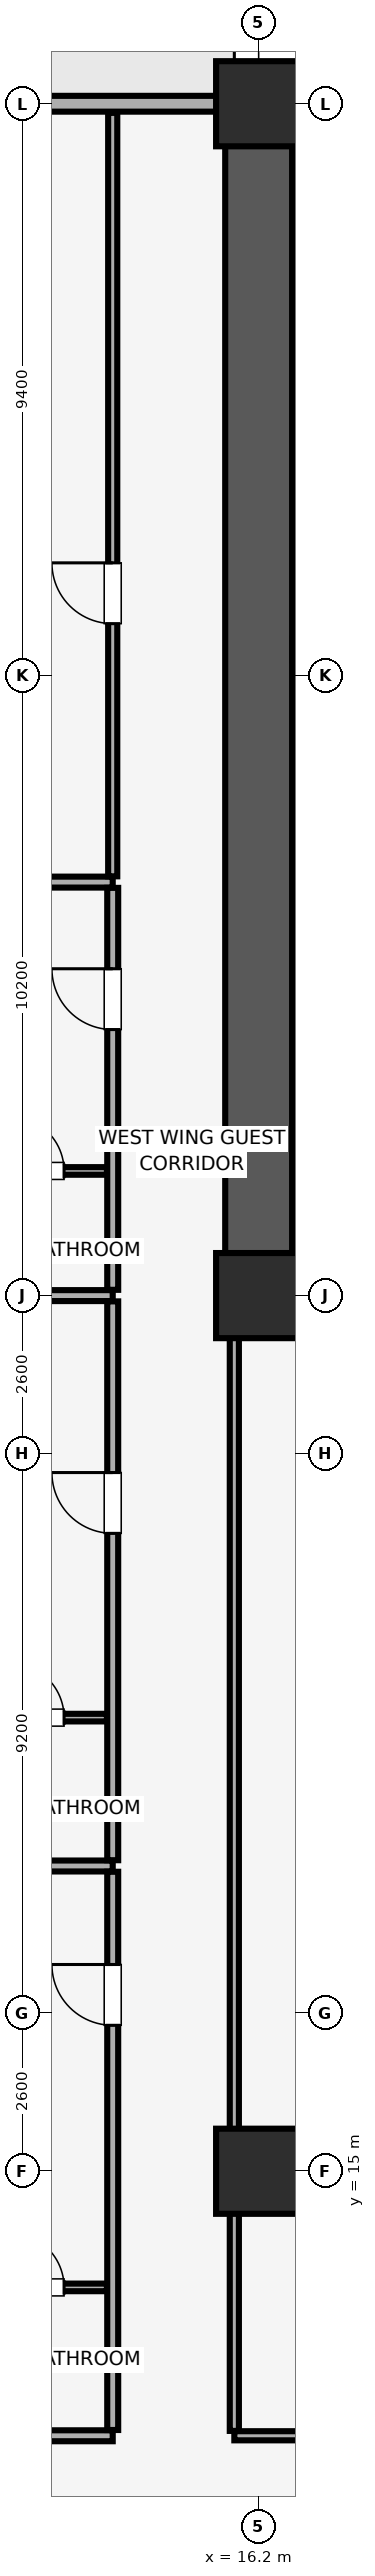
"""IFC4 building model, lengths in metres.
Left out: names, types, materials, properties, quantities, classifications, styles, units other than length and angle.
Written with IfcOpenShell. Run it as: python <this file> out.ifc"""

import sys

from ifc_helpers import new_model, si_unit, direction, frame, frame_2d, origin, origin_2d, place, context, subcontext, project, spatial, rectangle, extrude, element, fill, save


model = new_model("IFC4")
c1 = context("Model", 3, precision=1e-05, world=origin(), true_north=direction((0.0, 1.0)))
c2 = subcontext(c1, "Body", "Model", "MODEL_VIEW")
j1 = project(units=[si_unit("LENGTHUNIT", "METRE"), si_unit("PLANEANGLEUNIT", "RADIAN")], contexts=[c1])
p1 = place(None, origin())
s1 = spatial("IfcSite", under=j1, at=p1, CompositionType="ELEMENT")
p2 = place(p1, origin())
s2 = spatial("IfcBuilding", under=s1, at=p2, CompositionType="ELEMENT")
p3 = place(p2, frame((0.0, 0.0, 31.4)))
s3 = spatial("IfcBuildingStorey", under=s2, at=p3, CompositionType="ELEMENT", Elevation=31.4)
for number, where, z_axis, x_axis in (
    (1, (16.2, 15.0, 0.0), (0.0, 0.0, 1.0), (1.0, 0.0, 0.0)),
    (2, (16.2, 29.4, 0.0), (0.0, 0.0, 1.0), (1.0, 0.0, 0.0)),
    (3, (16.2, 49.0, 0.0), (0.0, 0.0, 1.0), (1.0, 0.0, 0.0)),
):
    element("IfcColumn", number, at=place(p3, frame(where, z_axis=z_axis, x_axis=x_axis)), inside=s3, PredefinedType="COLUMN", context=c2, shape_type="SweptSolid", body=[
        extrude(rectangle(XDim=1.4, YDim=1.4, at=origin_2d()), origin(), (0.0, 0.0, 1.0), 3.51),
    ])
p4 = place(p3, frame((79.8, 49.0, 0.0), z_axis=(0.0, 0.0, 1.0), x_axis=(-1.0, 0.0, 0.0)))
e4 = element("IfcWall", 4, at=p4, inside=s3, PredefinedType="SOLIDWALL", context=c2, shape_type="SweptSolid", body=[
    extrude(rectangle(XDim=75.6, YDim=0.26, at=frame_2d((37.8, 0.0))), origin(), (0.0, 0.0, 1.0), 2.56),
])
p5 = place(p4, frame((72.565, 0.0, 0.85)))
e5 = element("IfcOpeningElement", 5, at=p5, cuts=e4, PredefinedType="OPENING", context=c2, shape_type="SweptSolid", body=[
    extrude(rectangle(XDim=1.5, YDim=1.4, at=frame_2d((0.75, 0.7))), frame((0.0, 0.14, 0.0), z_axis=(0.0, -1.0, 0.0), x_axis=(1.0, 0.0, 0.0)), (0.0, 0.0, 1.0), 0.28),
])
p6 = place(p4, frame((67.45, 0.0, 0.85)))
e6 = element("IfcOpeningElement", 6, at=p6, cuts=e4, PredefinedType="OPENING", context=c2, shape_type="SweptSolid", body=[
    extrude(rectangle(XDim=1.5, YDim=1.4, at=frame_2d((0.75, 0.7))), frame((0.0, 0.14, 0.0), z_axis=(0.0, -1.0, 0.0), x_axis=(1.0, 0.0, 0.0)), (0.0, 0.0, 1.0), 0.28),
])
p7 = place(p4, frame((6.65, 0.0, 0.85)))
e7 = element("IfcOpeningElement", 7, at=p7, cuts=e4, PredefinedType="OPENING", context=c2, shape_type="SweptSolid", body=[
    extrude(rectangle(XDim=1.5, YDim=1.4, at=frame_2d((0.75, 0.7))), frame((0.0, 0.14, 0.0), z_axis=(0.0, -1.0, 0.0), x_axis=(1.0, 0.0, 0.0)), (0.0, 0.0, 1.0), 0.28),
])
p8 = place(p4, frame((1.535, 0.0, 0.85)))
e8 = element("IfcOpeningElement", 8, at=p8, cuts=e4, PredefinedType="OPENING", context=c2, shape_type="SweptSolid", body=[
    extrude(rectangle(XDim=1.5, YDim=1.4, at=frame_2d((0.75, 0.7))), frame((0.0, 0.14, 0.0), z_axis=(0.0, -1.0, 0.0), x_axis=(1.0, 0.0, 0.0)), (0.0, 0.0, 1.0), 0.28),
])
p9 = place(p4, frame((51.365, 0.0, 0.9)))
e9 = element("IfcOpeningElement", 9, at=p9, cuts=e4, PredefinedType="OPENING", context=c2, shape_type="SweptSolid", body=[
    extrude(rectangle(XDim=1.5, YDim=1.4, at=frame_2d((0.75, 0.7))), frame((0.0, 0.14, 0.0), z_axis=(0.0, -1.0, 0.0), x_axis=(1.0, 0.0, 0.0)), (0.0, 0.0, 1.0), 0.28),
])
p10 = place(p4, frame((46.0, 0.0, 0.9)))
e10 = element("IfcOpeningElement", 10, at=p10, cuts=e4, PredefinedType="OPENING", context=c2, shape_type="SweptSolid", body=[
    extrude(rectangle(XDim=1.5, YDim=1.4, at=frame_2d((0.75, 0.7))), frame((0.0, 0.14, 0.0), z_axis=(0.0, -1.0, 0.0), x_axis=(1.0, 0.0, 0.0)), (0.0, 0.0, 1.0), 0.28),
])
p11 = place(p4, frame((29.15, 0.0, 0.9)))
e11 = element("IfcOpeningElement", 11, at=p11, cuts=e4, PredefinedType="OPENING", context=c2, shape_type="SweptSolid", body=[
    extrude(rectangle(XDim=1.5, YDim=1.4, at=frame_2d((0.75, 0.7))), frame((0.0, 0.14, 0.0), z_axis=(0.0, -1.0, 0.0), x_axis=(1.0, 0.0, 0.0)), (0.0, 0.0, 1.0), 0.28),
])
p12 = place(p4, frame((23.485, 0.0, 0.9)))
e12 = element("IfcOpeningElement", 12, at=p12, cuts=e4, PredefinedType="OPENING", context=c2, shape_type="SweptSolid", body=[
    extrude(rectangle(XDim=1.5, YDim=1.4, at=frame_2d((0.75, 0.7))), frame((0.0, 0.14, 0.0), z_axis=(0.0, -1.0, 0.0), x_axis=(1.0, 0.0, 0.0)), (0.0, 0.0, 1.0), 0.28),
])
p13 = place(p3, frame((16.2, 29.4, 0.0), z_axis=(0.0, 0.0, 1.0), x_axis=(0.0, 1.0, 0.0)))
e13 = element("IfcWall", 13, at=p13, inside=s3, PredefinedType="SHEAR", context=c2, shape_type="SweptSolid", body=[
    extrude(rectangle(XDim=19.2, YDim=1.1, at=frame_2d((9.6, 0.0))), origin(), (0.0, 0.0, 1.0), 3.51),
])
p14 = place(p3, frame((16.755, 29.4, 0.0), z_axis=(0.0, 0.0, 1.0), x_axis=(1.0, 0.0, 0.0)))
e14 = element("IfcWall", 14, at=p14, inside=s3, PredefinedType="SHEAR", context=c2, shape_type="SweptSolid", body=[
    extrude(rectangle(XDim=6.845, YDim=1.1, at=frame_2d((3.423, 0.0))), origin(), (0.0, 0.0, 1.0), 3.51),
])
p15 = place(p3, frame((16.755, 40.025, 0.0), z_axis=(0.0, 0.0, 1.0), x_axis=(1.0, 0.0, 0.0)))
e15 = element("IfcWall", 15, at=p15, inside=s3, PredefinedType="SHEAR", context=c2, shape_type="SweptSolid", body=[
    extrude(rectangle(XDim=4.1, YDim=0.35, at=frame_2d((2.05, 0.0))), origin(), (0.0, 0.0, 1.0), 3.51),
])
p16 = place(p15, frame((1.71, 0.0, 0.0)))
e16 = element("IfcOpeningElement", 16, at=p16, cuts=e15, PredefinedType="OPENING", context=c2, shape_type="SweptSolid", body=[
    extrude(rectangle(XDim=1.15, YDim=2.15, at=frame_2d((0.575, 1.075))), frame((0.0, 0.185, 0.0), z_axis=(0.0, -1.0, 0.0), x_axis=(1.0, 0.0, 0.0)), (0.0, 0.0, 1.0), 0.37),
])
p17 = place(p3, frame((15.8, 10.65, 0.0), z_axis=(0.0, 0.0, 1.0), x_axis=(1.0, 0.0, 0.0)))
e17 = element("IfcWall", 17, at=p17, inside=s3, PredefinedType="PARTITIONING", context=c2, shape_type="SweptSolid", body=[
    extrude(rectangle(XDim=9.4, YDim=0.15, at=frame_2d((4.7, 0.0))), origin(), (0.0, 0.0, 1.0), 3.51),
])
p18 = place(p17, frame((4.2, 0.0, 0.0)))
e18 = element("IfcOpeningElement", 18, at=p18, cuts=e17, PredefinedType="OPENING", context=c2, shape_type="SweptSolid", body=[
    extrude(rectangle(XDim=1.0, YDim=2.15, at=frame_2d((0.5, 1.075))), frame((0.0, 0.085, 0.0), z_axis=(0.0, -1.0, 0.0), x_axis=(1.0, 0.0, 0.0)), (0.0, 0.0, 1.0), 0.17),
])
p19 = place(p3, frame((15.8, 10.73, 0.0), z_axis=(0.0, 0.0, 1.0), x_axis=(0.0, 1.0, 0.0)))
e19 = element("IfcWall", 19, at=p19, inside=s3, PredefinedType="PARTITIONING", context=c2, shape_type="SweptSolid", body=[
    extrude(rectangle(XDim=18.66, YDim=0.15, at=frame_2d((9.33, 0.0))), origin(), (0.0, 0.0, 1.0), 3.51),
])
for number, where, z_axis, x_axis in (
    (20, (0.15, 10.65, 0.0), (0.0, 0.0, 1.0), (1.0, 0.0, 0.0)),
    (21, (0.15, 20.02, 0.0), (0.0, 0.0, 1.0), (1.0, 0.0, 0.0)),
):
    element("IfcWall", number, at=place(p3, frame(where, z_axis=z_axis, x_axis=x_axis)), inside=s3, PredefinedType="PARTITIONING", context=c2, shape_type="SweptSolid", body=[
        extrude(rectangle(XDim=13.65, YDim=0.18, at=frame_2d((6.825, 0.0))), origin(), (0.0, 0.0, 1.0), 3.51),
    ])
p20 = place(p3, frame((13.8, 10.745, 0.0), z_axis=(0.0, 0.0, 1.0), x_axis=(0.0, 1.0, 0.0)))
e22 = element("IfcWall", 22, at=p20, inside=s3, PredefinedType="PARTITIONING", context=c2, shape_type="SweptSolid", body=[
    extrude(rectangle(XDim=9.18, YDim=0.18, at=frame_2d((4.59, 0.0))), origin(), (0.0, 0.0, 1.0), 3.51),
])
p21 = place(p20, frame((6.655, 0.0, 0.0)))
e23 = element("IfcOpeningElement", 23, at=p21, cuts=e22, PredefinedType="OPENING", context=c2, shape_type="SweptSolid", body=[
    extrude(rectangle(XDim=1.0, YDim=2.15, at=frame_2d((0.5, 1.075))), frame((0.0, 0.1, 0.0), z_axis=(0.0, -1.0, 0.0), x_axis=(1.0, 0.0, 0.0)), (0.0, 0.0, 1.0), 0.2),
])
p22 = place(p3, frame((11.3, 13.09, 0.0), z_axis=(0.0, 0.0, 1.0), x_axis=(1.0, 0.0, 0.0)))
e24 = element("IfcWall", 24, at=p22, inside=s3, PredefinedType="PARTITIONING", context=c2, shape_type="SweptSolid", body=[
    extrude(rectangle(XDim=2.405, YDim=0.125, at=frame_2d((1.203, 0.0))), origin(), (0.0, 0.0, 1.0), 3.51),
])
p23 = place(p22, frame((0.8, 0.0, 0.0)))
e25 = element("IfcOpeningElement", 25, at=p23, cuts=e24, PredefinedType="OPENING", context=c2, shape_type="SweptSolid", body=[
    extrude(rectangle(XDim=0.9, YDim=2.1, at=frame_2d((0.45, 1.05))), frame((0.0, 0.073, 0.0), z_axis=(0.0, -1.0, 0.0), x_axis=(1.0, 0.0, 0.0)), (0.0, 0.0, 1.0), 0.145),
])
p24 = place(p3, frame((0.15, 29.4, 0.0), z_axis=(0.0, 0.0, 1.0), x_axis=(1.0, 0.0, 0.0)))
e26 = element("IfcWall", 26, at=p24, inside=s3, PredefinedType="PARTITIONING", context=c2, shape_type="SweptSolid", body=[
    extrude(rectangle(XDim=13.65, YDim=0.18, at=frame_2d((6.825, 0.0))), origin(), (0.0, 0.0, 1.0), 2.86),
])
p25 = place(p3, frame((13.8, 20.115, 0.0), z_axis=(0.0, 0.0, 1.0), x_axis=(0.0, 1.0, 0.0)))
e27 = element("IfcWall", 27, at=p25, inside=s3, PredefinedType="PARTITIONING", context=c2, shape_type="SweptSolid", body=[
    extrude(rectangle(XDim=9.19, YDim=0.18, at=frame_2d((4.595, 0.0))), origin(), (0.0, 0.0, 1.0), 3.51),
])
p26 = place(p25, frame((5.375, 0.0, 0.0)))
e28 = element("IfcOpeningElement", 28, at=p26, cuts=e27, PredefinedType="OPENING", context=c2, shape_type="SweptSolid", body=[
    extrude(rectangle(XDim=1.0, YDim=2.15, at=frame_2d((0.5, 1.075))), frame((0.0, 0.1, 0.0), z_axis=(0.0, -1.0, 0.0), x_axis=(1.0, 0.0, 0.0)), (0.0, 0.0, 1.0), 0.2),
])
p27 = place(p3, frame((11.3, 22.46, 0.0), z_axis=(0.0, 0.0, 1.0), x_axis=(1.0, 0.0, 0.0)))
e29 = element("IfcWall", 29, at=p27, inside=s3, PredefinedType="PARTITIONING", context=c2, shape_type="SweptSolid", body=[
    extrude(rectangle(XDim=2.405, YDim=0.125, at=frame_2d((1.203, 0.0))), origin(), (0.0, 0.0, 1.0), 3.51),
])
p28 = place(p27, frame((0.8, 0.0, 0.0)))
e30 = element("IfcOpeningElement", 30, at=p28, cuts=e29, PredefinedType="OPENING", context=c2, shape_type="SweptSolid", body=[
    extrude(rectangle(XDim=0.9, YDim=2.1, at=frame_2d((0.45, 1.05))), frame((0.0, 0.073, 0.0), z_axis=(0.0, -1.0, 0.0), x_axis=(1.0, 0.0, 0.0)), (0.0, 0.0, 1.0), 0.145),
])
p29 = place(p3, frame((0.15, 36.2, 0.0), z_axis=(0.0, 0.0, 1.0), x_axis=(1.0, 0.0, 0.0)))
e31 = element("IfcWall", 31, at=p29, inside=s3, PredefinedType="PARTITIONING", context=c2, shape_type="SweptSolid", body=[
    extrude(rectangle(XDim=13.65, YDim=0.18, at=frame_2d((6.825, 0.0))), origin(), (0.0, 0.0, 1.0), 3.51),
])
p30 = place(p3, frame((13.8, 29.495, 0.0), z_axis=(0.0, 0.0, 1.0), x_axis=(0.0, 1.0, 0.0)))
e32 = element("IfcWall", 32, at=p30, inside=s3, PredefinedType="PARTITIONING", context=c2, shape_type="SweptSolid", body=[
    extrude(rectangle(XDim=6.61, YDim=0.18, at=frame_2d((3.305, 0.0))), origin(), (0.0, 0.0, 1.0), 3.51),
])
p31 = place(p30, frame((4.28, 0.0, 0.0)))
e33 = element("IfcOpeningElement", 33, at=p31, cuts=e32, PredefinedType="OPENING", context=c2, shape_type="SweptSolid", body=[
    extrude(rectangle(XDim=1.0, YDim=2.15, at=frame_2d((0.5, 1.075))), frame((0.0, 0.1, 0.0), z_axis=(0.0, -1.0, 0.0), x_axis=(1.0, 0.0, 0.0)), (0.0, 0.0, 1.0), 0.2),
])
p32 = place(p3, frame((11.3, 31.45, 0.0), z_axis=(0.0, 0.0, 1.0), x_axis=(1.0, 0.0, 0.0)))
e34 = element("IfcWall", 34, at=p32, inside=s3, PredefinedType="PARTITIONING", context=c2, shape_type="SweptSolid", body=[
    extrude(rectangle(XDim=2.405, YDim=0.125, at=frame_2d((1.203, 0.0))), origin(), (0.0, 0.0, 1.0), 3.51),
])
p33 = place(p32, frame((0.8, 0.0, 0.0)))
e35 = element("IfcOpeningElement", 35, at=p33, cuts=e34, PredefinedType="OPENING", context=c2, shape_type="SweptSolid", body=[
    extrude(rectangle(XDim=0.9, YDim=2.1, at=frame_2d((0.45, 1.05))), frame((0.0, 0.073, 0.0), z_axis=(0.0, -1.0, 0.0), x_axis=(1.0, 0.0, 0.0)), (0.0, 0.0, 1.0), 0.145),
])
p34 = place(p3, frame((13.8, 36.295, 0.0), z_axis=(0.0, 0.0, 1.0), x_axis=(0.0, 1.0, 0.0)))
e36 = element("IfcWall", 36, at=p34, inside=s3, PredefinedType="PARTITIONING", context=c2, shape_type="SweptSolid", body=[
    extrude(rectangle(XDim=12.555, YDim=0.15, at=frame_2d((6.278, 0.0))), origin(), (0.0, 0.0, 1.0), 3.51),
])
p35 = place(p34, frame((4.155, 0.0, 0.0)))
e37 = element("IfcOpeningElement", 37, at=p35, cuts=e36, PredefinedType="OPENING", context=c2, shape_type="SweptSolid", body=[
    extrude(rectangle(XDim=1.0, YDim=2.15, at=frame_2d((0.5, 1.075))), frame((0.0, 0.085, 0.0), z_axis=(0.0, -1.0, 0.0), x_axis=(1.0, 0.0, 0.0)), (0.0, 0.0, 1.0), 0.17),
])
p36 = place(p21, origin())
e38 = element("IfcDoor", 38, at=p36, inside=s3, OperationType="SINGLE_SWING_RIGHT", PredefinedType="DOOR", context=c2, shape_type="SweptSolid", body=[
    extrude(rectangle(XDim=1.0, YDim=2.15, at=frame_2d((0.5, 1.075))), frame((0.0, 0.025, 0.0), z_axis=(0.0, -1.0, 0.0), x_axis=(1.0, 0.0, 0.0)), (0.0, 0.0, 1.0), 0.05),
])
fill(e23, e38)
p37 = place(p23, origin())
e39 = element("IfcDoor", 39, at=p37, inside=s3, OperationType="SINGLE_SWING_LEFT", PredefinedType="DOOR", context=c2, shape_type="SweptSolid", body=[
    extrude(rectangle(XDim=0.9, YDim=2.1, at=frame_2d((0.45, 1.05))), frame((0.0, 0.025, 0.0), z_axis=(0.0, -1.0, 0.0), x_axis=(1.0, 0.0, 0.0)), (0.0, 0.0, 1.0), 0.05),
])
fill(e25, e39)
p38 = place(p26, origin())
e40 = element("IfcDoor", 40, at=p38, inside=s3, OperationType="SINGLE_SWING_RIGHT", PredefinedType="DOOR", context=c2, shape_type="SweptSolid", body=[
    extrude(rectangle(XDim=1.0, YDim=2.15, at=frame_2d((0.5, 1.075))), frame((0.0, 0.025, 0.0), z_axis=(0.0, -1.0, 0.0), x_axis=(1.0, 0.0, 0.0)), (0.0, 0.0, 1.0), 0.05),
])
fill(e28, e40)
p39 = place(p28, origin())
e41 = element("IfcDoor", 41, at=p39, inside=s3, OperationType="SINGLE_SWING_LEFT", PredefinedType="DOOR", context=c2, shape_type="SweptSolid", body=[
    extrude(rectangle(XDim=0.9, YDim=2.1, at=frame_2d((0.45, 1.05))), frame((0.0, 0.025, 0.0), z_axis=(0.0, -1.0, 0.0), x_axis=(1.0, 0.0, 0.0)), (0.0, 0.0, 1.0), 0.05),
])
fill(e30, e41)
p40 = place(p31, origin())
e42 = element("IfcDoor", 42, at=p40, inside=s3, OperationType="SINGLE_SWING_RIGHT", PredefinedType="DOOR", context=c2, shape_type="SweptSolid", body=[
    extrude(rectangle(XDim=1.0, YDim=2.15, at=frame_2d((0.5, 1.075))), frame((0.0, 0.025, 0.0), z_axis=(0.0, -1.0, 0.0), x_axis=(1.0, 0.0, 0.0)), (0.0, 0.0, 1.0), 0.05),
])
fill(e33, e42)
p41 = place(p33, origin())
e43 = element("IfcDoor", 43, at=p41, inside=s3, OperationType="SINGLE_SWING_LEFT", PredefinedType="DOOR", context=c2, shape_type="SweptSolid", body=[
    extrude(rectangle(XDim=0.9, YDim=2.1, at=frame_2d((0.45, 1.05))), frame((0.0, 0.025, 0.0), z_axis=(0.0, -1.0, 0.0), x_axis=(1.0, 0.0, 0.0)), (0.0, 0.0, 1.0), 0.05),
])
fill(e35, e43)
p42 = place(p35, origin())
e44 = element("IfcDoor", 44, at=p42, inside=s3, OperationType="SINGLE_SWING_RIGHT", PredefinedType="DOOR", context=c2, shape_type="SweptSolid", body=[
    extrude(rectangle(XDim=1.0, YDim=2.15, at=frame_2d((0.5, 1.075))), frame((0.0, 0.025, 0.0), z_axis=(0.0, -1.0, 0.0), x_axis=(1.0, 0.0, 0.0)), (0.0, 0.0, 1.0), 0.05),
])
fill(e37, e44)
save(model, sys.argv[1])
